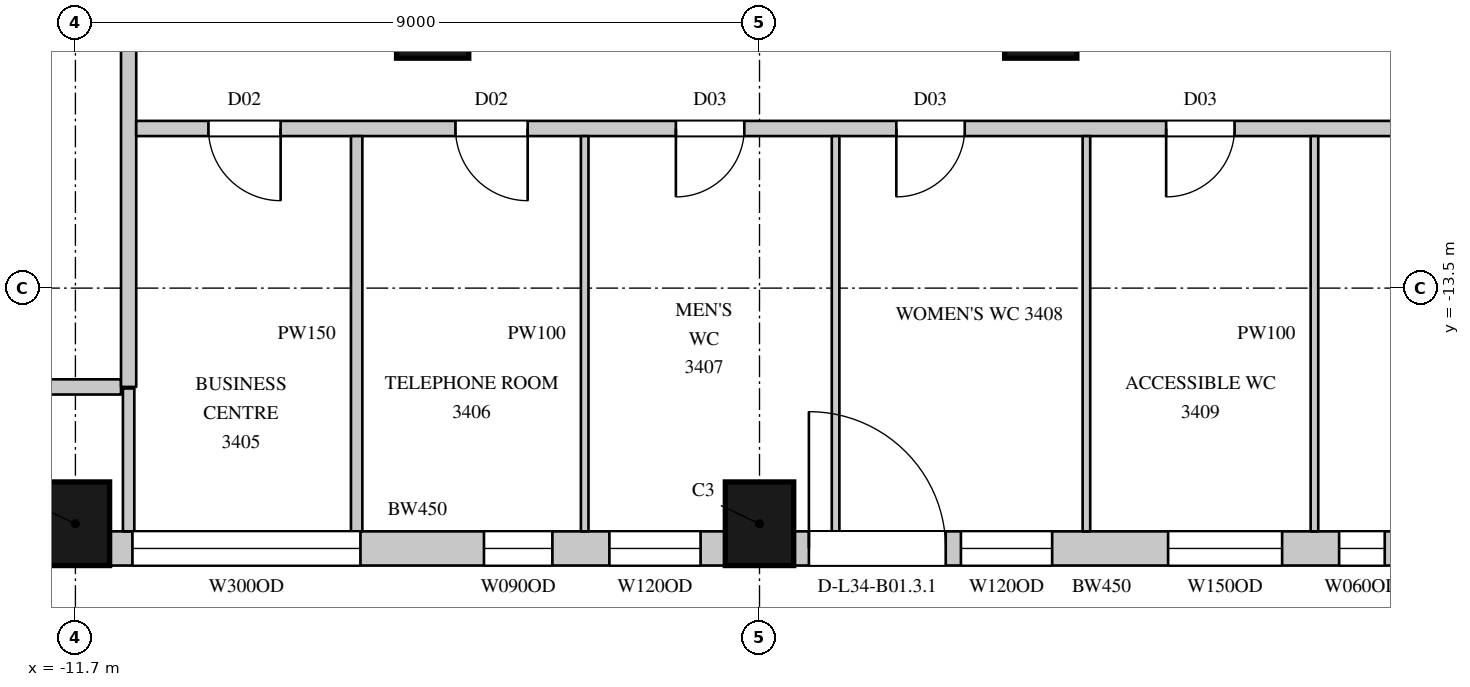
"""IFC4 building model, lengths in metres.
Left out: names, types, materials, properties, quantities, classifications, styles, units other than length and angle.
Written with IfcOpenShell. Run it as: python <this file> out.ifc"""

import sys

from ifc_helpers import new_model, si_unit, direction, frame, frame_2d, origin, origin_2d, place, context, subcontext, project, spatial, rectangle, circle, extrude, element, fill, save


model = new_model("IFC4")
c1 = context("Model", 3, precision=1e-05, world=origin(), true_north=direction((0.0, 1.0)))
c2 = subcontext(c1, "Body", "Model", "MODEL_VIEW")
j1 = project(units=[si_unit("LENGTHUNIT", "METRE"), si_unit("PLANEANGLEUNIT", "RADIAN")], contexts=[c1])
p1 = place(None, origin())
s1 = spatial("IfcSite", under=j1, at=p1, CompositionType="ELEMENT")
p2 = place(p1, origin())
s2 = spatial("IfcBuilding", under=s1, at=p2, CompositionType="ELEMENT")
p3 = place(p2, frame((0.0, 0.0, 160.5)))
s3 = spatial("IfcBuildingStorey", under=s2, at=p3, CompositionType="ELEMENT", Elevation=160.5)
for number, where, z_axis, x_axis in (
    (1, (-11.7, -16.6, 0.0), (0.0, 0.0, 1.0), (1.0, 0.0, 0.0)),
    (2, (-2.7, -16.6, 0.0), (0.0, 0.0, 1.0), (1.0, 0.0, 0.0)),
):
    element("IfcColumn", number, at=place(p3, frame(where, z_axis=z_axis, x_axis=x_axis)), inside=s3, PredefinedType="COLUMN", context=c2, shape_type="SweptSolid", body=[
        extrude(rectangle(XDim=0.9, YDim=1.1, at=origin_2d()), origin(), (0.0, 0.0, 1.0), 4.1),
    ])
for number, where, z_axis, x_axis in (
    (3, (-7.0, -10.0, 0.0), (0.0, 0.0, 1.0), (1.0, 0.0, 0.0)),
    (4, (1.0, -10.0, 0.0), (0.0, 0.0, 1.0), (1.0, 0.0, 0.0)),
):
    element("IfcColumn", number, at=place(p3, frame(where, z_axis=z_axis, x_axis=x_axis)), inside=s3, PredefinedType="COLUMN", context=c2, shape_type="SweptSolid", body=[
        extrude(circle(Radius=0.475, at=origin_2d()), origin(), (0.0, 0.0, 1.0), 4.1),
    ])
p4 = place(p3, frame((-11.25, -16.925, 0.0), z_axis=(0.0, 0.0, 1.0), x_axis=(1.0, 0.0, 0.0)))
e5 = element("IfcWall", 5, at=p4, inside=s3, PredefinedType="SOLIDWALL", context=c2, shape_type="SweptSolid", body=[
    extrude(rectangle(XDim=8.1, YDim=0.45, at=frame_2d((4.05, 0.0))), origin(), (0.0, 0.0, 1.0), 3.8),
])
p5 = place(p4, frame((0.3, 0.0, 1.05)))
e6 = element("IfcOpeningElement", 6, at=p5, cuts=e5, PredefinedType="OPENING", context=c2, shape_type="SweptSolid", body=[
    extrude(rectangle(XDim=3.0, YDim=2.4, at=frame_2d((1.5, 1.2))), frame((0.0, 0.235, 0.0), z_axis=(0.0, -1.0, 0.0), x_axis=(1.0, 0.0, 0.0)), (0.0, 0.0, 1.0), 0.47),
])
p6 = place(p4, frame((4.925, 0.0, 1.05)))
e7 = element("IfcOpeningElement", 7, at=p6, cuts=e5, PredefinedType="OPENING", context=c2, shape_type="SweptSolid", body=[
    extrude(rectangle(XDim=0.9, YDim=2.4, at=frame_2d((0.45, 1.2))), frame((0.0, 0.235, 0.0), z_axis=(0.0, -1.0, 0.0), x_axis=(1.0, 0.0, 0.0)), (0.0, 0.0, 1.0), 0.47),
])
p7 = place(p4, frame((6.575, 0.0, 1.05)))
e8 = element("IfcOpeningElement", 8, at=p7, cuts=e5, PredefinedType="OPENING", context=c2, shape_type="SweptSolid", body=[
    extrude(rectangle(XDim=1.2, YDim=2.4, at=frame_2d((0.6, 1.2))), frame((0.0, 0.235, 0.0), z_axis=(0.0, -1.0, 0.0), x_axis=(1.0, 0.0, 0.0)), (0.0, 0.0, 1.0), 0.47),
])
p8 = place(p3, frame((-2.25, -16.925, 0.0), z_axis=(0.0, 0.0, 1.0), x_axis=(1.0, 0.0, 0.0)))
e9 = element("IfcWall", 9, at=p8, inside=s3, PredefinedType="SOLIDWALL", context=c2, shape_type="SweptSolid", body=[
    extrude(rectangle(XDim=8.1, YDim=0.45, at=frame_2d((4.05, 0.0))), origin(), (0.0, 0.0, 1.0), 3.8),
])
p9 = place(p8, frame((0.2, 0.0, 0.0)))
e10 = element("IfcOpeningElement", 10, at=p9, cuts=e9, PredefinedType="OPENING", context=c2, shape_type="SweptSolid", body=[
    extrude(rectangle(XDim=1.8, YDim=2.4, at=frame_2d((0.9, 1.2))), frame((0.0, 0.235, 0.0), z_axis=(0.0, -1.0, 0.0), x_axis=(1.0, 0.0, 0.0)), (0.0, 0.0, 1.0), 0.47),
])
p10 = place(p8, frame((2.2, 0.0, 1.05)))
e11 = element("IfcOpeningElement", 11, at=p10, cuts=e9, PredefinedType="OPENING", context=c2, shape_type="SweptSolid", body=[
    extrude(rectangle(XDim=1.2, YDim=2.4, at=frame_2d((0.6, 1.2))), frame((0.0, 0.235, 0.0), z_axis=(0.0, -1.0, 0.0), x_axis=(1.0, 0.0, 0.0)), (0.0, 0.0, 1.0), 0.47),
])
p11 = place(p8, frame((4.926, 0.0, 1.05)))
e12 = element("IfcOpeningElement", 12, at=p11, cuts=e9, PredefinedType="OPENING", context=c2, shape_type="SweptSolid", body=[
    extrude(rectangle(XDim=1.5, YDim=2.4, at=frame_2d((0.75, 1.2))), frame((0.0, 0.235, 0.0), z_axis=(0.0, -1.0, 0.0), x_axis=(1.0, 0.0, 0.0)), (0.0, 0.0, 1.0), 0.47),
])
p12 = place(p8, frame((7.176, 0.0, 1.05)))
e13 = element("IfcOpeningElement", 13, at=p12, cuts=e9, PredefinedType="OPENING", context=c2, shape_type="SweptSolid", body=[
    extrude(rectangle(XDim=0.6, YDim=2.4, at=frame_2d((0.3, 1.2))), frame((0.0, 0.235, 0.0), z_axis=(0.0, -1.0, 0.0), x_axis=(1.0, 0.0, 0.0)), (0.0, 0.0, 1.0), 0.47),
])
p13 = place(p3, frame((-13.97, -14.8, 0.0), z_axis=(0.0, 0.0, 1.0), x_axis=(1.0, 0.0, 0.0)))
e14 = element("IfcWall", 14, at=p13, inside=s3, PredefinedType="PARTITIONING", context=c2, shape_type="SweptSolid", body=[
    extrude(rectangle(XDim=2.87, YDim=0.2, at=frame_2d((1.435, 0.0))), origin(), (0.0, 0.0, 1.0), 3.8),
])
p14 = place(p3, frame((-11.0, -14.8, 0.0), z_axis=(0.0, 0.0, 1.0), x_axis=(0.0, 1.0, 0.0)))
e15 = element("IfcWall", 15, at=p14, inside=s3, PredefinedType="PARTITIONING", context=c2, shape_type="SweptSolid", body=[
    extrude(rectangle(XDim=29.6, YDim=0.2, at=frame_2d((14.8, 0.0))), origin(), (0.0, 0.0, 1.0), 3.8),
])
p15 = place(p14, frame((19.25, 0.0, 0.0)))
e16 = element("IfcOpeningElement", 16, at=p15, cuts=e15, PredefinedType="OPENING", context=c2, shape_type="SweptSolid", body=[
    extrude(rectangle(XDim=1.5, YDim=2.4, at=frame_2d((0.75, 1.2))), frame((0.0, 0.11, 0.0), z_axis=(0.0, -1.0, 0.0), x_axis=(1.0, 0.0, 0.0)), (0.0, 0.0, 1.0), 0.22),
])
p16 = place(p3, frame((-10.9, -11.4, 0.0), z_axis=(0.0, 0.0, 1.0), x_axis=(1.0, 0.0, 0.0)))
e17 = element("IfcWall", 17, at=p16, inside=s3, PredefinedType="PARTITIONING", context=c2, shape_type="SweptSolid", body=[
    extrude(rectangle(XDim=21.2, YDim=0.2, at=frame_2d((10.6, 0.0))), origin(), (0.0, 0.0, 1.0), 3.8),
])
p17 = place(p16, frame((0.95, 0.0, 0.0)))
e18 = element("IfcOpeningElement", 18, at=p17, cuts=e17, PredefinedType="OPENING", context=c2, shape_type="SweptSolid", body=[
    extrude(rectangle(XDim=0.95, YDim=2.2, at=frame_2d((0.475, 1.1))), frame((0.0, 0.11, 0.0), z_axis=(0.0, -1.0, 0.0), x_axis=(1.0, 0.0, 0.0)), (0.0, 0.0, 1.0), 0.22),
])
p18 = place(p16, frame((4.2, 0.0, 0.0)))
e19 = element("IfcOpeningElement", 19, at=p18, cuts=e17, PredefinedType="OPENING", context=c2, shape_type="SweptSolid", body=[
    extrude(rectangle(XDim=0.95, YDim=2.2, at=frame_2d((0.475, 1.1))), frame((0.0, 0.11, 0.0), z_axis=(0.0, -1.0, 0.0), x_axis=(1.0, 0.0, 0.0)), (0.0, 0.0, 1.0), 0.22),
])
p19 = place(p16, frame((7.1, 0.0, 0.0)))
e20 = element("IfcOpeningElement", 20, at=p19, cuts=e17, PredefinedType="OPENING", context=c2, shape_type="SweptSolid", body=[
    extrude(rectangle(XDim=0.9, YDim=2.2, at=frame_2d((0.45, 1.1))), frame((0.0, 0.11, 0.0), z_axis=(0.0, -1.0, 0.0), x_axis=(1.0, 0.0, 0.0)), (0.0, 0.0, 1.0), 0.22),
])
p20 = place(p16, frame((10.0, 0.0, 0.0)))
e21 = element("IfcOpeningElement", 21, at=p20, cuts=e17, PredefinedType="OPENING", context=c2, shape_type="SweptSolid", body=[
    extrude(rectangle(XDim=0.9, YDim=2.2, at=frame_2d((0.45, 1.1))), frame((0.0, 0.11, 0.0), z_axis=(0.0, -1.0, 0.0), x_axis=(1.0, 0.0, 0.0)), (0.0, 0.0, 1.0), 0.22),
])
p21 = place(p16, frame((13.55, 0.0, 0.0)))
e22 = element("IfcOpeningElement", 22, at=p21, cuts=e17, PredefinedType="OPENING", context=c2, shape_type="SweptSolid", body=[
    extrude(rectangle(XDim=0.9, YDim=2.2, at=frame_2d((0.45, 1.1))), frame((0.0, 0.11, 0.0), z_axis=(0.0, -1.0, 0.0), x_axis=(1.0, 0.0, 0.0)), (0.0, 0.0, 1.0), 0.22),
])
p22 = place(p16, frame((17.85, 0.0, 0.0)))
e23 = element("IfcOpeningElement", 23, at=p22, cuts=e17, PredefinedType="OPENING", context=c2, shape_type="SweptSolid", body=[
    extrude(rectangle(XDim=1.1, YDim=2.4, at=frame_2d((0.55, 1.2))), frame((0.0, 0.11, 0.0), z_axis=(0.0, -1.0, 0.0), x_axis=(1.0, 0.0, 0.0)), (0.0, 0.0, 1.0), 0.22),
])
p23 = place(p3, frame((-11.0, -16.7, 0.0), z_axis=(0.0, 0.0, 1.0), x_axis=(0.0, 1.0, 0.0)))
e24 = element("IfcWall", 24, at=p23, inside=s3, PredefinedType="PARTITIONING", context=c2, shape_type="SweptSolid", body=[
    extrude(rectangle(XDim=1.88, YDim=0.15, at=frame_2d((0.94, 0.0))), origin(), (0.0, 0.0, 1.0), 3.8),
])
p24 = place(p3, frame((-8.0, -16.7, 0.0), z_axis=(0.0, 0.0, 1.0), x_axis=(0.0, 1.0, 0.0)))
e25 = element("IfcWall", 25, at=p24, inside=s3, PredefinedType="PARTITIONING", context=c2, shape_type="SweptSolid", body=[
    extrude(rectangle(XDim=5.2, YDim=0.15, at=frame_2d((2.6, 0.0))), origin(), (0.0, 0.0, 1.0), 3.8),
])
for number, where, z_axis, x_axis in (
    (26, (-5.0, -16.7, 0.0), (0.0, 0.0, 1.0), (0.0, 1.0, 0.0)),
    (27, (-1.699, -16.7, 0.0), (0.0, 0.0, 1.0), (0.0, 1.0, 0.0)),
):
    element("IfcWall", number, at=place(p3, frame(where, z_axis=z_axis, x_axis=x_axis)), inside=s3, PredefinedType="PARTITIONING", context=c2, shape_type="SweptSolid", body=[
        extrude(rectangle(XDim=5.2, YDim=0.1, at=frame_2d((2.6, 0.0))), origin(), (0.0, 0.0, 1.0), 3.8),
    ])
p25 = place(p3, frame((1.601, -16.7, 0.0), z_axis=(0.0, 0.0, 1.0), x_axis=(0.0, 1.0, 0.0)))
e28 = element("IfcWall", 28, at=p25, inside=s3, PredefinedType="PARTITIONING", context=c2, shape_type="SweptSolid", body=[
    extrude(rectangle(XDim=5.2, YDim=0.1, at=frame_2d((2.6, 0.0))), origin(), (0.0, 0.0, 1.0), 3.15),
])
p26 = place(p3, frame((4.601, -16.7, 0.0), z_axis=(0.0, 0.0, 1.0), x_axis=(0.0, 1.0, 0.0)))
e29 = element("IfcWall", 29, at=p26, inside=s3, PredefinedType="PARTITIONING", context=c2, shape_type="SweptSolid", body=[
    extrude(rectangle(XDim=5.2, YDim=0.1, at=frame_2d((2.6, 0.0))), origin(), (0.0, 0.0, 1.0), 3.8),
])
p27 = place(p5, origin())
e30 = element("IfcWindow", 30, at=p27, inside=s3, PartitioningType="SINGLE_PANEL", PredefinedType="WINDOW", context=c2, shape_type="SweptSolid", body=[
    extrude(rectangle(XDim=3.0, YDim=2.4, at=frame_2d((1.5, 1.2))), frame((0.0, 0.135, 0.0), z_axis=(0.0, -1.0, 0.0), x_axis=(1.0, 0.0, 0.0)), (0.0, 0.0, 1.0), 0.06),
])
fill(e6, e30)
p28 = place(p9, origin())
e31 = element("IfcDoor", 31, at=p28, inside=s3, OperationType="SLIDING_TO_LEFT", PredefinedType="DOOR", context=c2, shape_type="SweptSolid", body=[
    extrude(rectangle(XDim=1.8, YDim=2.4, at=frame_2d((0.9, 1.2))), frame((0.0, 0.13, 0.0), z_axis=(0.0, -1.0, 0.0), x_axis=(1.0, 0.0, 0.0)), (0.0, 0.0, 1.0), 0.05),
])
fill(e10, e31)
p29 = place(p10, origin())
e32 = element("IfcWindow", 32, at=p29, inside=s3, PartitioningType="SINGLE_PANEL", PredefinedType="WINDOW", context=c2, shape_type="SweptSolid", body=[
    extrude(rectangle(XDim=1.2, YDim=2.4, at=frame_2d((0.6, 1.2))), frame((0.0, 0.135, 0.0), z_axis=(0.0, -1.0, 0.0), x_axis=(1.0, 0.0, 0.0)), (0.0, 0.0, 1.0), 0.06),
])
fill(e11, e32)
p30 = place(p17, origin())
e33 = element("IfcDoor", 33, at=p30, inside=s3, OperationType="SINGLE_SWING_LEFT", PredefinedType="DOOR", context=c2, shape_type="SweptSolid", body=[
    extrude(rectangle(XDim=0.95, YDim=2.2, at=frame_2d((0.475, 1.1))), frame((0.0, 0.025, 0.0), z_axis=(0.0, -1.0, 0.0), x_axis=(1.0, 0.0, 0.0)), (0.0, 0.0, 1.0), 0.05),
])
fill(e18, e33)
p31 = place(p18, origin())
e34 = element("IfcDoor", 34, at=p31, inside=s3, OperationType="SINGLE_SWING_LEFT", PredefinedType="DOOR", context=c2, shape_type="SweptSolid", body=[
    extrude(rectangle(XDim=0.95, YDim=2.2, at=frame_2d((0.475, 1.1))), frame((0.0, 0.025, 0.0), z_axis=(0.0, -1.0, 0.0), x_axis=(1.0, 0.0, 0.0)), (0.0, 0.0, 1.0), 0.05),
])
fill(e19, e34)
p32 = place(p19, origin())
e35 = element("IfcDoor", 35, at=p32, inside=s3, OperationType="SINGLE_SWING_RIGHT", PredefinedType="DOOR", context=c2, shape_type="SweptSolid", body=[
    extrude(rectangle(XDim=0.9, YDim=2.2, at=frame_2d((0.45, 1.1))), frame((0.0, 0.025, 0.0), z_axis=(0.0, -1.0, 0.0), x_axis=(1.0, 0.0, 0.0)), (0.0, 0.0, 1.0), 0.05),
])
fill(e20, e35)
p33 = place(p20, origin())
e36 = element("IfcDoor", 36, at=p33, inside=s3, OperationType="SINGLE_SWING_RIGHT", PredefinedType="DOOR", context=c2, shape_type="SweptSolid", body=[
    extrude(rectangle(XDim=0.9, YDim=2.2, at=frame_2d((0.45, 1.1))), frame((0.0, 0.025, 0.0), z_axis=(0.0, -1.0, 0.0), x_axis=(1.0, 0.0, 0.0)), (0.0, 0.0, 1.0), 0.05),
])
fill(e21, e36)
p34 = place(p21, origin())
e37 = element("IfcDoor", 37, at=p34, inside=s3, OperationType="SINGLE_SWING_RIGHT", PredefinedType="DOOR", context=c2, shape_type="SweptSolid", body=[
    extrude(rectangle(XDim=0.9, YDim=2.2, at=frame_2d((0.45, 1.1))), frame((0.0, 0.025, 0.0), z_axis=(0.0, -1.0, 0.0), x_axis=(1.0, 0.0, 0.0)), (0.0, 0.0, 1.0), 0.05),
])
fill(e22, e37)
p35 = place(p6, origin())
e38 = element("IfcWindow", 38, at=p35, inside=s3, PartitioningType="SINGLE_PANEL", PredefinedType="WINDOW", context=c2, shape_type="SweptSolid", body=[
    extrude(rectangle(XDim=0.9, YDim=2.4, at=frame_2d((0.45, 1.2))), frame((0.0, 0.135, 0.0), z_axis=(0.0, -1.0, 0.0), x_axis=(1.0, 0.0, 0.0)), (0.0, 0.0, 1.0), 0.06),
])
fill(e7, e38)
p36 = place(p7, origin())
e39 = element("IfcWindow", 39, at=p36, inside=s3, PartitioningType="SINGLE_PANEL", PredefinedType="WINDOW", context=c2, shape_type="SweptSolid", body=[
    extrude(rectangle(XDim=1.2, YDim=2.4, at=frame_2d((0.6, 1.2))), frame((0.0, 0.135, 0.0), z_axis=(0.0, -1.0, 0.0), x_axis=(1.0, 0.0, 0.0)), (0.0, 0.0, 1.0), 0.06),
])
fill(e8, e39)
p37 = place(p11, origin())
e40 = element("IfcWindow", 40, at=p37, inside=s3, PartitioningType="SINGLE_PANEL", PredefinedType="WINDOW", context=c2, shape_type="SweptSolid", body=[
    extrude(rectangle(XDim=1.5, YDim=2.4, at=frame_2d((0.75, 1.2))), frame((0.0, 0.135, 0.0), z_axis=(0.0, -1.0, 0.0), x_axis=(1.0, 0.0, 0.0)), (0.0, 0.0, 1.0), 0.06),
])
fill(e12, e40)
p38 = place(p12, origin())
e41 = element("IfcWindow", 41, at=p38, inside=s3, PartitioningType="SINGLE_PANEL", PredefinedType="WINDOW", context=c2, shape_type="SweptSolid", body=[
    extrude(rectangle(XDim=0.6, YDim=2.4, at=frame_2d((0.3, 1.2))), frame((0.0, 0.135, 0.0), z_axis=(0.0, -1.0, 0.0), x_axis=(1.0, 0.0, 0.0)), (0.0, 0.0, 1.0), 0.06),
])
fill(e13, e41)
save(model, sys.argv[1])
